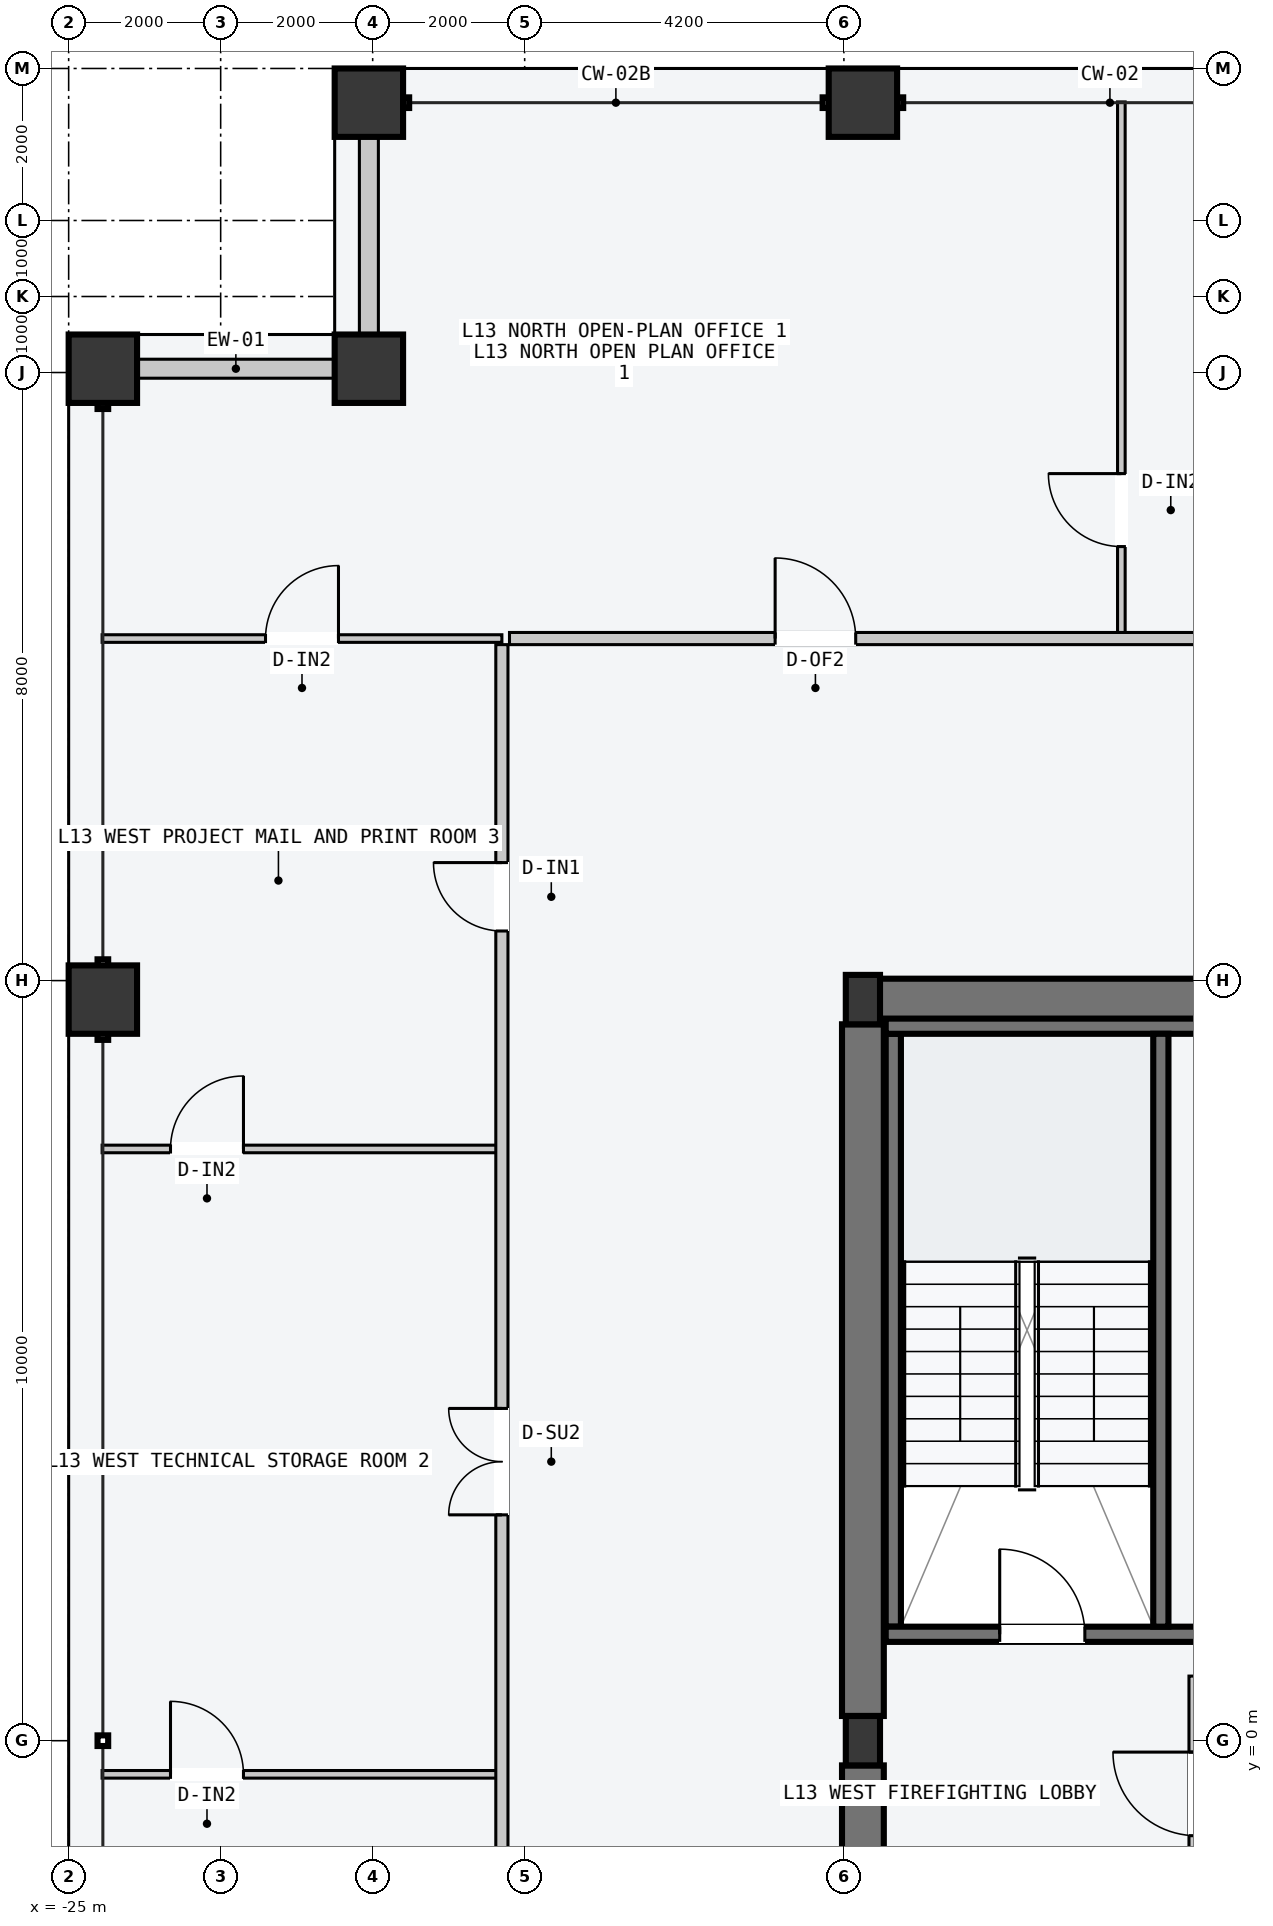
"""IFC4 building model, lengths in metres.
Left out: names, types, materials, properties, quantities, classifications, styles, units other than length and angle.
Written with IfcOpenShell. Run it as: python <this file> out.ifc"""

import sys

from ifc_helpers import new_model, si_unit, direction, frame, frame_2d, origin, origin_2d, place, context, subcontext, project, spatial, rectangle, hollow_rectangle, i_section, extrude, element, fill, save


model = new_model("IFC4")
c1 = context("Model", 3, precision=1e-05, world=origin(), true_north=direction((0.0, 1.0)))
c2 = subcontext(c1, "Body", "Model", "MODEL_VIEW")
j1 = project(units=[si_unit("LENGTHUNIT", "METRE"), si_unit("PLANEANGLEUNIT", "RADIAN")], contexts=[c1])
p1 = place(None, origin())
s1 = spatial("IfcSite", under=j1, at=p1, CompositionType="ELEMENT")
p2 = place(p1, origin())
s2 = spatial("IfcBuilding", under=s1, at=p2, CompositionType="ELEMENT")
p3 = place(p2, frame((0.0, 0.0, 52.8)))
s3 = spatial("IfcBuildingStorey", under=s2, at=p3, CompositionType="ELEMENT", Elevation=52.8)
p4 = place(p3, frame((-14.53, 9.75, -0.2), z_axis=(0.0, 0.0, 1.0), x_axis=(1.0, 0.0, 0.0)))
e1 = element("IfcWall", 1, at=p4, inside=s3, PredefinedType="SHEAR", context=c2, shape_type="SweptSolid", body=[
    extrude(rectangle(XDim=6.46, YDim=0.55, at=frame_2d((3.23, 0.0))), origin(), (0.0, 0.0, 1.0), 3.6),
])
for number, where, z_axis, x_axis in (
    (2, (-14.55, -9.425, -0.2), (0.0, 0.0, 1.0), (0.0, 1.0, 0.0)),
    (3, (-14.55, 0.325, -0.2), (0.0, 0.0, 1.0), (0.0, 1.0, 0.0)),
):
    element("IfcWall", number, at=place(p3, frame(where, z_axis=z_axis, x_axis=x_axis)), inside=s3, PredefinedType="SHEAR", context=c2, shape_type="SweptSolid", body=[
        extrude(rectangle(XDim=9.1, YDim=0.55, at=frame_2d((4.55, 0.0))), origin(), (0.0, 0.0, 1.0), 3.6),
    ])
p5 = place(p3, frame((-14.15, 1.5, -0.2), z_axis=(0.0, 0.0, 1.0), x_axis=(0.0, 1.0, 0.0)))
e4 = element("IfcWall", 4, at=p5, inside=s3, PredefinedType="SOLIDWALL", context=c2, shape_type="SweptSolid", body=[
    extrude(rectangle(XDim=7.8, YDim=0.2, at=frame_2d((3.9, 0.0))), origin(), (0.0, 0.0, 1.0), 3.6),
])
p6 = place(p3, frame((-14.25, 1.4, -0.2), z_axis=(0.0, 0.0, 1.0), x_axis=(1.0, 0.0, 0.0)))
e5 = element("IfcWall", 5, at=p6, inside=s3, PredefinedType="SOLIDWALL", context=c2, shape_type="SweptSolid", body=[
    extrude(rectangle(XDim=4.1, YDim=0.2, at=frame_2d((2.05, 0.0))), origin(), (0.0, 0.0, 1.0), 3.6),
])
p7 = place(p6, frame((1.5, 0.0, 0.2)))
e6 = element("IfcOpeningElement", 6, at=p7, cuts=e5, PredefinedType="OPENING", context=c2, shape_type="SweptSolid", body=[
    extrude(rectangle(XDim=1.12, YDim=2.18, at=frame_2d((0.56, 1.09))), frame((0.0, 0.11, 0.0), z_axis=(0.0, -1.0, 0.0), x_axis=(1.0, 0.0, 0.0)), (0.0, 0.0, 1.0), 0.22),
])
p8 = place(p3, frame((-14.25, 9.4, -0.2), z_axis=(0.0, 0.0, 1.0), x_axis=(1.0, 0.0, 0.0)))
e7 = element("IfcWall", 7, at=p8, inside=s3, PredefinedType="SOLIDWALL", context=c2, shape_type="SweptSolid", body=[
    extrude(rectangle(XDim=4.1, YDim=0.2, at=frame_2d((2.05, 0.0))), origin(), (0.0, 0.0, 1.0), 3.6),
])
p9 = place(p3, frame((-10.63, 1.5, -0.2), z_axis=(0.0, 0.0, 1.0), x_axis=(0.0, 1.0, 0.0)))
e8 = element("IfcWall", 8, at=p9, inside=s3, PredefinedType="SOLIDWALL", context=c2, shape_type="SweptSolid", body=[
    extrude(rectangle(XDim=7.8, YDim=0.2, at=frame_2d((3.9, 0.0))), origin(), (0.0, 0.0, 1.0), 3.6),
])
for number, where, z_axis, x_axis in (
    (9, (-14.55, 0.0, 0.0), (0.0, 0.0, 1.0), (1.0, 0.0, 0.0)),
    (10, (-14.55, 9.75, 0.0), (0.0, 0.0, 1.0), (1.0, 0.0, 0.0)),
):
    element("IfcColumn", number, at=place(p3, frame(where, z_axis=z_axis, x_axis=x_axis)), inside=s3, PredefinedType="COLUMN", context=c2, shape_type="SweptSolid", body=[
        extrude(i_section(OverallWidth=0.45, OverallDepth=0.65, WebThickness=0.025, FlangeThickness=0.04, at=origin_2d()), origin(), (0.0, 0.0, 1.0), 3.6),
    ])
for number, where, z_axis, x_axis in (
    (11, (-21.05, 21.55, 0.0), (0.0, 0.0, 1.0), (1.0, 0.0, 0.0)),
    (12, (-14.55, 21.55, 0.0), (0.0, 0.0, 1.0), (1.0, 0.0, 0.0)),
    (13, (-24.55, 9.75, 0.0), (0.0, 0.0, 1.0), (0.0, 1.0, 0.0)),
    (14, (-24.55, 18.05, 0.0), (0.0, 0.0, 1.0), (0.0, 1.0, 0.0)),
    (15, (-21.05, 18.05, 0.0), (0.0, 0.0, 1.0), (1.0, 0.0, 0.0)),
):
    element("IfcColumn", number, at=place(p3, frame(where, z_axis=z_axis, x_axis=x_axis)), inside=s3, PredefinedType="COLUMN", context=c2, shape_type="SweptSolid", body=[
        extrude(hollow_rectangle(XDim=0.9, YDim=0.9, WallThickness=0.045, at=origin_2d()), origin(), (0.0, 0.0, 1.0), 3.6),
    ])
for number, where, z_axis, x_axis in (
    (16, (-24.09, 18.05, 0.0), (0.0, 0.0, 1.0), (1.0, 0.0, 0.0)),
    (17, (-21.05, 18.51, 0.0), (0.0, 0.0, 1.0), (0.0, 1.0, 0.0)),
):
    element("IfcWall", number, at=place(p3, frame(where, z_axis=z_axis, x_axis=x_axis)), inside=s3, PredefinedType="STANDARD", context=c2, shape_type="SweptSolid", body=[
        extrude(rectangle(XDim=2.58, YDim=0.25, at=frame_2d((1.29, 0.0))), origin(), (0.0, 0.0, 1.0), 2.7),
    ])
p10 = place(p3, frame((-10.16, -2.55, 0.0), z_axis=(0.0, 0.0, 1.0), x_axis=(0.0, 1.0, 0.0)))
e18 = element("IfcWall", 18, at=p10, inside=s3, PredefinedType="PARTITIONING", context=c2, shape_type="SweptSolid", body=[
    extrude(rectangle(XDim=3.4, YDim=0.2, at=frame_2d((1.7, 0.0))), origin(), (0.0, 0.0, 1.0), 3.4),
])
p11 = place(p10, frame((1.3, 0.0, 0.0)))
e19 = element("IfcOpeningElement", 19, at=p11, cuts=e18, PredefinedType="OPENING", context=c2, shape_type="SweptSolid", body=[
    extrude(rectangle(XDim=1.1, YDim=2.15, at=frame_2d((0.55, 1.075))), frame((0.0, 0.11, 0.0), z_axis=(0.0, -1.0, 0.0), x_axis=(1.0, 0.0, 0.0)), (0.0, 0.0, 1.0), 0.22),
])
p12 = place(p3, frame((-11.15, 14.56, 0.0), z_axis=(0.0, 0.0, 1.0), x_axis=(0.0, 1.0, 0.0)))
e20 = element("IfcWall", 20, at=p12, inside=s3, PredefinedType="PARTITIONING", context=c2, shape_type="SweptSolid", body=[
    extrude(rectangle(XDim=7.0, YDim=0.1, at=frame_2d((3.5, 0.0))), origin(), (0.0, 0.0, 1.0), 3.4),
])
p13 = place(p12, frame((1.15, 0.0, 0.0)))
e21 = element("IfcOpeningElement", 21, at=p13, cuts=e20, PredefinedType="OPENING", context=c2, shape_type="SweptSolid", body=[
    extrude(rectangle(XDim=0.96, YDim=2.18, at=frame_2d((0.48, 1.09))), frame((0.0, 0.06, 0.0), z_axis=(0.0, -1.0, 0.0), x_axis=(1.0, 0.0, 0.0)), (0.0, 0.0, 1.0), 0.12),
])
p14 = place(p3, frame((-19.2, 14.5, 0.0), z_axis=(0.0, 0.0, 1.0), x_axis=(1.0, 0.0, 0.0)))
e22 = element("IfcWall", 22, at=p14, inside=s3, PredefinedType="PARTITIONING", context=c2, shape_type="SweptSolid", body=[
    extrude(rectangle(XDim=38.4, YDim=0.16, at=frame_2d((19.2, 0.0))), origin(), (0.0, 0.0, 1.0), 3.4),
])
p15 = place(p14, frame((3.495, 0.0, 0.0)))
e23 = element("IfcOpeningElement", 23, at=p15, cuts=e22, PredefinedType="OPENING", context=c2, shape_type="SweptSolid", body=[
    extrude(rectangle(XDim=1.06, YDim=2.2, at=frame_2d((0.53, 1.1))), frame((0.0, 0.09, 0.0), z_axis=(0.0, -1.0, 0.0), x_axis=(1.0, 0.0, 0.0)), (0.0, 0.0, 1.0), 0.18),
])
p16 = place(p14, frame((14.001, 0.0, 0.0)))
e24 = element("IfcOpeningElement", 24, at=p16, cuts=e22, PredefinedType="OPENING", context=c2, shape_type="SweptSolid", body=[
    extrude(rectangle(XDim=1.24, YDim=2.24, at=frame_2d((0.62, 1.12))), frame((0.0, 0.09, 0.0), z_axis=(0.0, -1.0, 0.0), x_axis=(1.0, 0.0, 0.0)), (0.0, 0.0, 1.0), 0.18),
])
p17 = place(p14, frame((24.672, 0.0, 0.0)))
e25 = element("IfcOpeningElement", 25, at=p17, cuts=e22, PredefinedType="OPENING", context=c2, shape_type="SweptSolid", body=[
    extrude(rectangle(XDim=1.4, YDim=2.2, at=frame_2d((0.7, 1.1))), frame((0.0, 0.09, 0.0), z_axis=(0.0, -1.0, 0.0), x_axis=(1.0, 0.0, 0.0)), (0.0, 0.0, 1.0), 0.18),
])
p18 = place(p14, frame((33.527, 0.0, 0.0)))
e26 = element("IfcOpeningElement", 26, at=p18, cuts=e22, PredefinedType="OPENING", context=c2, shape_type="SweptSolid", body=[
    extrude(rectangle(XDim=0.9, YDim=2.15, at=frame_2d((0.45, 1.075))), frame((0.0, 0.09, 0.0), z_axis=(0.0, -1.0, 0.0), x_axis=(1.0, 0.0, 0.0)), (0.0, 0.0, 1.0), 0.18),
])
p19 = place(p3, frame((-24.56, 14.5, 0.0), z_axis=(0.0, 0.0, 1.0), x_axis=(1.0, 0.0, 0.0)))
e27 = element("IfcWall", 27, at=p19, inside=s3, PredefinedType="PARTITIONING", context=c2, shape_type="SweptSolid", body=[
    extrude(rectangle(XDim=5.26, YDim=0.1, at=frame_2d((2.63, 0.0))), origin(), (0.0, 0.0, 1.0), 3.4),
])
p20 = place(p19, frame((2.15, 0.0, 0.0)))
e28 = element("IfcOpeningElement", 28, at=p20, cuts=e27, PredefinedType="OPENING", context=c2, shape_type="SweptSolid", body=[
    extrude(rectangle(XDim=0.96, YDim=2.18, at=frame_2d((0.48, 1.09))), frame((0.0, 0.06, 0.0), z_axis=(0.0, -1.0, 0.0), x_axis=(1.0, 0.0, 0.0)), (0.0, 0.0, 1.0), 0.12),
])
p21 = place(p3, frame((-24.56, -0.442, 0.0), z_axis=(0.0, 0.0, 1.0), x_axis=(1.0, 0.0, 0.0)))
e29 = element("IfcWall", 29, at=p21, inside=s3, PredefinedType="PARTITIONING", context=c2, shape_type="SweptSolid", body=[
    extrude(rectangle(XDim=5.2, YDim=0.1, at=frame_2d((2.6, 0.0))), origin(), (0.0, 0.0, 1.0), 3.4),
])
p22 = place(p21, frame((0.9, 0.0, 0.0)))
e30 = element("IfcOpeningElement", 30, at=p22, cuts=e29, PredefinedType="OPENING", context=c2, shape_type="SweptSolid", body=[
    extrude(rectangle(XDim=0.96, YDim=2.18, at=frame_2d((0.48, 1.09))), frame((0.0, 0.06, 0.0), z_axis=(0.0, -1.0, 0.0), x_axis=(1.0, 0.0, 0.0)), (0.0, 0.0, 1.0), 0.12),
])
p23 = place(p3, frame((-24.56, 7.785, 0.0), z_axis=(0.0, 0.0, 1.0), x_axis=(1.0, 0.0, 0.0)))
e31 = element("IfcWall", 31, at=p23, inside=s3, PredefinedType="PARTITIONING", context=c2, shape_type="SweptSolid", body=[
    extrude(rectangle(XDim=5.2, YDim=0.1, at=frame_2d((2.6, 0.0))), origin(), (0.0, 0.0, 1.0), 3.4),
])
p24 = place(p23, frame((0.9, 0.0, 0.0)))
e32 = element("IfcOpeningElement", 32, at=p24, cuts=e31, PredefinedType="OPENING", context=c2, shape_type="SweptSolid", body=[
    extrude(rectangle(XDim=0.96, YDim=2.18, at=frame_2d((0.48, 1.09))), frame((0.0, 0.06, 0.0), z_axis=(0.0, -1.0, 0.0), x_axis=(1.0, 0.0, 0.0)), (0.0, 0.0, 1.0), 0.12),
])
p25 = place(p3, frame((-19.3, -12.12, 0.0), z_axis=(0.0, 0.0, 1.0), x_axis=(0.0, 1.0, 0.0)))
e33 = element("IfcWall", 33, at=p25, inside=s3, PredefinedType="PARTITIONING", context=c2, shape_type="SweptSolid", body=[
    extrude(rectangle(XDim=26.54, YDim=0.16, at=frame_2d((13.27, 0.0))), origin(), (0.0, 0.0, 1.0), 3.4),
])
p26 = place(p25, frame((0.9, 0.0, 0.0)))
e34 = element("IfcOpeningElement", 34, at=p26, cuts=e33, PredefinedType="OPENING", context=c2, shape_type="SweptSolid", body=[
    extrude(rectangle(XDim=1.24, YDim=2.24, at=frame_2d((0.62, 1.12))), frame((0.0, 0.09, 0.0), z_axis=(0.0, -1.0, 0.0), x_axis=(1.0, 0.0, 0.0)), (0.0, 0.0, 1.0), 0.18),
])
p27 = place(p25, frame((15.091, 0.0, 0.0)))
e35 = element("IfcOpeningElement", 35, at=p27, cuts=e33, PredefinedType="OPENING", context=c2, shape_type="SweptSolid", body=[
    extrude(rectangle(XDim=1.4, YDim=2.2, at=frame_2d((0.7, 1.1))), frame((0.0, 0.09, 0.0), z_axis=(0.0, -1.0, 0.0), x_axis=(1.0, 0.0, 0.0)), (0.0, 0.0, 1.0), 0.18),
])
p28 = place(p25, frame((22.772, 0.0, 0.0)))
e36 = element("IfcOpeningElement", 36, at=p28, cuts=e33, PredefinedType="OPENING", context=c2, shape_type="SweptSolid", body=[
    extrude(rectangle(XDim=0.9, YDim=2.15, at=frame_2d((0.45, 1.075))), frame((0.0, 0.09, 0.0), z_axis=(0.0, -1.0, 0.0), x_axis=(1.0, 0.0, 0.0)), (0.0, 0.0, 1.0), 0.18),
])
p29 = place(p7, origin())
e37 = element("IfcDoor", 37, at=p29, inside=s3, OperationType="SINGLE_SWING_LEFT", PredefinedType="DOOR", context=c2, shape_type="SweptSolid", body=[
    extrude(rectangle(XDim=1.12, YDim=2.18, at=frame_2d((0.56, 1.09))), frame((0.0, 0.025, 0.0), z_axis=(0.0, -1.0, 0.0), x_axis=(1.0, 0.0, 0.0)), (0.0, 0.0, 1.0), 0.05),
])
fill(e6, e37)
p30 = place(p13, origin())
e38 = element("IfcDoor", 38, at=p30, inside=s3, OperationType="SINGLE_SWING_RIGHT", PredefinedType="DOOR", context=c2, shape_type="SweptSolid", body=[
    extrude(rectangle(XDim=0.96, YDim=2.18, at=frame_2d((0.48, 1.09))), frame((0.0, 0.025, 0.0), z_axis=(0.0, -1.0, 0.0), x_axis=(1.0, 0.0, 0.0)), (0.0, 0.0, 1.0), 0.05),
])
fill(e21, e38)
p31 = place(p15, origin())
e39 = element("IfcDoor", 39, at=p31, inside=s3, OperationType="SINGLE_SWING_LEFT", PredefinedType="DOOR", context=c2, shape_type="SweptSolid", body=[
    extrude(rectangle(XDim=1.06, YDim=2.2, at=frame_2d((0.53, 1.1))), frame((0.0, 0.025, 0.0), z_axis=(0.0, -1.0, 0.0), x_axis=(1.0, 0.0, 0.0)), (0.0, 0.0, 1.0), 0.05),
])
fill(e23, e39)
p32 = place(p20, origin())
e40 = element("IfcDoor", 40, at=p32, inside=s3, OperationType="SINGLE_SWING_RIGHT", PredefinedType="DOOR", context=c2, shape_type="SweptSolid", body=[
    extrude(rectangle(XDim=0.96, YDim=2.18, at=frame_2d((0.48, 1.09))), frame((0.0, 0.025, 0.0), z_axis=(0.0, -1.0, 0.0), x_axis=(1.0, 0.0, 0.0)), (0.0, 0.0, 1.0), 0.05),
])
fill(e28, e40)
p33 = place(p22, origin())
e41 = element("IfcDoor", 41, at=p33, inside=s3, OperationType="SINGLE_SWING_LEFT", PredefinedType="DOOR", context=c2, shape_type="SweptSolid", body=[
    extrude(rectangle(XDim=0.96, YDim=2.18, at=frame_2d((0.48, 1.09))), frame((0.0, 0.025, 0.0), z_axis=(0.0, -1.0, 0.0), x_axis=(1.0, 0.0, 0.0)), (0.0, 0.0, 1.0), 0.05),
])
fill(e30, e41)
p34 = place(p24, origin())
e42 = element("IfcDoor", 42, at=p34, inside=s3, OperationType="SINGLE_SWING_RIGHT", PredefinedType="DOOR", context=c2, shape_type="SweptSolid", body=[
    extrude(rectangle(XDim=0.96, YDim=2.18, at=frame_2d((0.48, 1.09))), frame((0.0, 0.025, 0.0), z_axis=(0.0, -1.0, 0.0), x_axis=(1.0, 0.0, 0.0)), (0.0, 0.0, 1.0), 0.05),
])
fill(e32, e42)
p35 = place(p27, origin())
e43 = element("IfcDoor", 43, at=p35, inside=s3, OperationType="DOUBLE_DOOR_SINGLE_SWING", PredefinedType="DOOR", context=c2, shape_type="SweptSolid", body=[
    extrude(rectangle(XDim=1.4, YDim=2.2, at=frame_2d((0.7, 1.1))), frame((0.0, 0.025, 0.0), z_axis=(0.0, -1.0, 0.0), x_axis=(1.0, 0.0, 0.0)), (0.0, 0.0, 1.0), 0.05),
])
fill(e35, e43)
p36 = place(p28, origin())
e44 = element("IfcDoor", 44, at=p36, inside=s3, OperationType="SINGLE_SWING_RIGHT", PredefinedType="DOOR", context=c2, shape_type="SweptSolid", body=[
    extrude(rectangle(XDim=0.9, YDim=2.15, at=frame_2d((0.45, 1.075))), frame((0.0, 0.025, 0.0), z_axis=(0.0, -1.0, 0.0), x_axis=(1.0, 0.0, 0.0)), (0.0, 0.0, 1.0), 0.05),
])
fill(e36, e44)
save(model, sys.argv[1])
